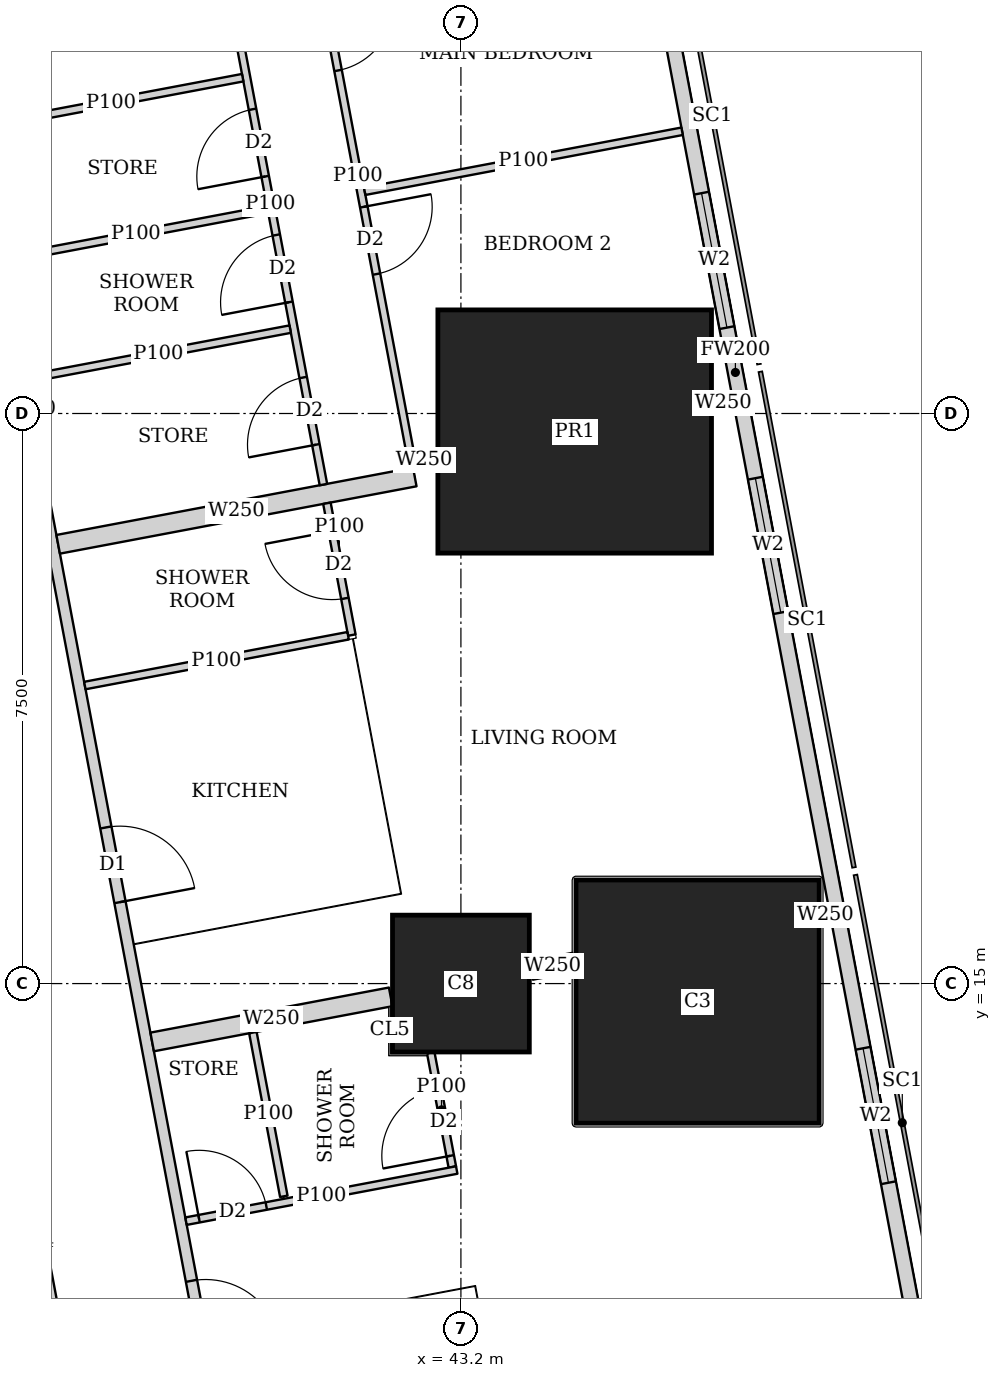
"""IFC4 building model, lengths in metres.
Left out: names, types, materials, properties, quantities, classifications, styles, units other than length and angle.
Written with IfcOpenShell. Run it as: python <this file> out.ifc"""

import sys

from ifc_helpers import new_model, si_unit, direction, frame, frame_2d, origin, origin_2d, place, context, subcontext, project, spatial, rectangle, extrude, element, fill, save


model = new_model("IFC4")
c1 = context("Model", 3, precision=1e-05, world=origin(), true_north=direction((0.0, 1.0)))
c2 = subcontext(c1, "Body", "Model", "MODEL_VIEW")
j1 = project(units=[si_unit("LENGTHUNIT", "METRE"), si_unit("PLANEANGLEUNIT", "RADIAN")], contexts=[c1])
p1 = place(None, origin())
s1 = spatial("IfcSite", under=j1, at=p1, CompositionType="ELEMENT")
p2 = place(p1, origin())
s2 = spatial("IfcBuilding", under=s1, at=p2, CompositionType="ELEMENT")
p3 = place(p2, frame((0.0, 0.0, 23.75)))
s3 = spatial("IfcBuildingStorey", under=s2, at=p3, CompositionType="ELEMENT", Elevation=23.75)
p4 = place(p3, frame((43.2, 15.0, 0.0), z_axis=(0.0, 0.0, 1.0), x_axis=(1.0, 0.0, 0.0)))
e1 = element("IfcColumn", 1, at=p4, inside=s3, PredefinedType="COLUMN", context=c2, shape_type="SweptSolid", body=[
    extrude(rectangle(XDim=1.8, YDim=1.8, at=origin_2d()), origin(), (0.0, 0.0, 1.0), 3.75),
])
p5 = place(p3, frame((46.314, 14.763, 0.0), z_axis=(0.0, 0.0, 1.0), x_axis=(1.0, 0.0, 0.0)))
e2 = element("IfcColumn", 2, at=p5, inside=s3, PredefinedType="COLUMN", context=c2, shape_type="SweptSolid", body=[
    extrude(rectangle(XDim=3.2, YDim=3.2, at=origin_2d()), origin(), (0.0, 0.0, 1.0), 3.75),
])
p6 = place(p3, frame((44.697, 22.263, 0.0), z_axis=(0.0, 0.0, 1.0), x_axis=(1.0, 0.0, 0.0)))
e3 = element("IfcColumn", 3, at=p6, inside=s3, PredefinedType="COLUMN", context=c2, shape_type="SweptSolid", body=[
    extrude(rectangle(XDim=3.6, YDim=3.2, at=origin_2d()), origin(), (0.0, 0.0, 1.0), 3.75),
])
p7 = place(p3, frame((50.653, 2.703, 0.0), z_axis=(0.0, 0.0, 1.0), x_axis=(-0.185612026696, 0.982623109613, 0.0)))
e4 = element("IfcWall", 4, at=p7, inside=s3, PredefinedType="SOLIDWALL", context=c2, shape_type="SweptSolid", body=[
    extrude(rectangle(XDim=41.393, YDim=0.2, at=frame_2d((20.697, 0.0))), origin(), (0.0, 0.0, 1.0), 3.5),
])
p8 = place(p7, frame((1.633, 0.0, 0.9)))
e5 = element("IfcOpeningElement", 5, at=p8, cuts=e4, PredefinedType="OPENING", context=c2, shape_type="SweptSolid", body=[
    extrude(rectangle(XDim=1.8, YDim=1.5, at=frame_2d((0.9, 0.75))), frame((0.0, 0.11, 0.0), z_axis=(0.0, -1.0, 0.0), x_axis=(1.0, 0.0, 0.0)), (0.0, 0.0, 1.0), 0.22),
])
p9 = place(p7, frame((6.032, 0.0, 0.9)))
e6 = element("IfcOpeningElement", 6, at=p9, cuts=e4, PredefinedType="OPENING", context=c2, shape_type="SweptSolid", body=[
    extrude(rectangle(XDim=1.8, YDim=1.5, at=frame_2d((0.9, 0.75))), frame((0.0, 0.11, 0.0), z_axis=(0.0, -1.0, 0.0), x_axis=(1.0, 0.0, 0.0)), (0.0, 0.0, 1.0), 0.22),
])
p10 = place(p7, frame((9.848, 0.0, 0.9)))
e7 = element("IfcOpeningElement", 7, at=p10, cuts=e4, PredefinedType="OPENING", context=c2, shape_type="SweptSolid", body=[
    extrude(rectangle(XDim=1.8, YDim=1.5, at=frame_2d((0.9, 0.75))), frame((0.0, 0.11, 0.0), z_axis=(0.0, -1.0, 0.0), x_axis=(1.0, 0.0, 0.0)), (0.0, 0.0, 1.0), 0.22),
])
p11 = place(p7, frame((17.481, 0.0, 0.9)))
e8 = element("IfcOpeningElement", 8, at=p11, cuts=e4, PredefinedType="OPENING", context=c2, shape_type="SweptSolid", body=[
    extrude(rectangle(XDim=1.8, YDim=1.5, at=frame_2d((0.9, 0.75))), frame((0.0, 0.11, 0.0), z_axis=(0.0, -1.0, 0.0), x_axis=(1.0, 0.0, 0.0)), (0.0, 0.0, 1.0), 0.22),
])
p12 = place(p7, frame((21.297, 0.0, 0.9)))
e9 = element("IfcOpeningElement", 9, at=p12, cuts=e4, PredefinedType="OPENING", context=c2, shape_type="SweptSolid", body=[
    extrude(rectangle(XDim=1.8, YDim=1.5, at=frame_2d((0.9, 0.75))), frame((0.0, 0.11, 0.0), z_axis=(0.0, -1.0, 0.0), x_axis=(1.0, 0.0, 0.0)), (0.0, 0.0, 1.0), 0.22),
])
p13 = place(p7, frame((25.113, 0.0, 0.9)))
e10 = element("IfcOpeningElement", 10, at=p13, cuts=e4, PredefinedType="OPENING", context=c2, shape_type="SweptSolid", body=[
    extrude(rectangle(XDim=1.8, YDim=1.5, at=frame_2d((0.9, 0.75))), frame((0.0, 0.11, 0.0), z_axis=(0.0, -1.0, 0.0), x_axis=(1.0, 0.0, 0.0)), (0.0, 0.0, 1.0), 0.22),
])
p14 = place(p7, frame((28.93, 0.0, 0.9)))
e11 = element("IfcOpeningElement", 11, at=p14, cuts=e4, PredefinedType="OPENING", context=c2, shape_type="SweptSolid", body=[
    extrude(rectangle(XDim=1.8, YDim=1.5, at=frame_2d((0.9, 0.75))), frame((0.0, 0.11, 0.0), z_axis=(0.0, -1.0, 0.0), x_axis=(1.0, 0.0, 0.0)), (0.0, 0.0, 1.0), 0.22),
])
p15 = place(p7, frame((32.746, 0.0, 0.9)))
e12 = element("IfcOpeningElement", 12, at=p15, cuts=e4, PredefinedType="OPENING", context=c2, shape_type="SweptSolid", body=[
    extrude(rectangle(XDim=1.8, YDim=1.5, at=frame_2d((0.9, 0.75))), frame((0.0, 0.11, 0.0), z_axis=(0.0, -1.0, 0.0), x_axis=(1.0, 0.0, 0.0)), (0.0, 0.0, 1.0), 0.22),
])
p16 = place(p7, frame((36.481, 0.0, 0.9)))
e13 = element("IfcOpeningElement", 13, at=p16, cuts=e4, PredefinedType="OPENING", context=c2, shape_type="SweptSolid", body=[
    extrude(rectangle(XDim=1.8, YDim=1.5, at=frame_2d((0.9, 0.75))), frame((0.0, 0.11, 0.0), z_axis=(0.0, -1.0, 0.0), x_axis=(1.0, 0.0, 0.0)), (0.0, 0.0, 1.0), 0.22),
])
p17 = place(p3, frame((33.755, 42.325, 0.0), z_axis=(0.0, 0.0, 1.0), x_axis=(0.185611461091, -0.982623216453, 0.0)))
e14 = element("IfcWall", 14, at=p17, inside=s3, PredefinedType="SOLIDWALL", context=c2, shape_type="SweptSolid", body=[
    extrude(rectangle(XDim=40.241, YDim=0.15, at=frame_2d((20.121, 0.0))), origin(), (0.0, 0.0, 1.0), 2.5),
])
p18 = place(p17, frame((7.325, 0.0, 0.0)))
e15 = element("IfcOpeningElement", 15, at=p18, cuts=e14, PredefinedType="OPENING", context=c2, shape_type="SweptSolid", body=[
    extrude(rectangle(XDim=1.0, YDim=2.1, at=frame_2d((0.5, 1.05))), frame((0.0, 0.085, 0.0), z_axis=(0.0, -1.0, 0.0), x_axis=(1.0, 0.0, 0.0)), (0.0, 0.0, 1.0), 0.17),
])
p19 = place(p17, frame((11.902, 0.0, 0.0)))
e16 = element("IfcOpeningElement", 16, at=p19, cuts=e14, PredefinedType="OPENING", context=c2, shape_type="SweptSolid", body=[
    extrude(rectangle(XDim=1.0, YDim=2.1, at=frame_2d((0.5, 1.05))), frame((0.0, 0.085, 0.0), z_axis=(0.0, -1.0, 0.0), x_axis=(1.0, 0.0, 0.0)), (0.0, 0.0, 1.0), 0.17),
])
p20 = place(p17, frame((25.718, 0.0, 0.0)))
e17 = element("IfcOpeningElement", 17, at=p20, cuts=e14, PredefinedType="OPENING", context=c2, shape_type="SweptSolid", body=[
    extrude(rectangle(XDim=1.0, YDim=2.1, at=frame_2d((0.5, 1.05))), frame((0.0, 0.085, 0.0), z_axis=(0.0, -1.0, 0.0), x_axis=(1.0, 0.0, 0.0)), (0.0, 0.0, 1.0), 0.17),
])
p21 = place(p17, frame((31.788, 0.0, 0.0)))
e18 = element("IfcOpeningElement", 18, at=p21, cuts=e14, PredefinedType="OPENING", context=c2, shape_type="SweptSolid", body=[
    extrude(rectangle(XDim=1.0, YDim=2.1, at=frame_2d((0.5, 1.05))), frame((0.0, 0.085, 0.0), z_axis=(0.0, -1.0, 0.0), x_axis=(1.0, 0.0, 0.0)), (0.0, 0.0, 1.0), 0.17),
])
p22 = place(p3, frame((41.157, 29.273, 0.0), z_axis=(0.0, 0.0, 1.0), x_axis=(0.18542464283, -0.982658486877, 0.0)))
e19 = element("IfcWall", 19, at=p22, inside=s3, PredefinedType="PARTITIONING", context=c2, shape_type="SweptSolid", body=[
    extrude(rectangle(XDim=7.421, YDim=0.1, at=frame_2d((3.71, 0.0))), origin(), (0.0, 0.0, 1.0), 2.5),
])
p23 = place(p22, frame((1.4, 0.0, 0.0)))
e20 = element("IfcOpeningElement", 20, at=p23, cuts=e19, PredefinedType="OPENING", context=c2, shape_type="SweptSolid", body=[
    extrude(rectangle(XDim=0.9, YDim=2.1, at=frame_2d((0.45, 1.05))), frame((0.0, 0.06, 0.0), z_axis=(0.0, -1.0, 0.0), x_axis=(1.0, 0.0, 0.0)), (0.0, 0.0, 1.0), 0.12),
])
p24 = place(p22, frame((4.126, 0.0, 0.0)))
e21 = element("IfcOpeningElement", 21, at=p24, cuts=e19, PredefinedType="OPENING", context=c2, shape_type="SweptSolid", body=[
    extrude(rectangle(XDim=0.9, YDim=2.1, at=frame_2d((0.45, 1.05))), frame((0.0, 0.06, 0.0), z_axis=(0.0, -1.0, 0.0), x_axis=(1.0, 0.0, 0.0)), (0.0, 0.0, 1.0), 0.12),
])
p25 = place(p3, frame((39.997, 28.942, 0.0), z_axis=(0.0, 0.0, 1.0), x_axis=(0.185686318797, -0.982609073341, 0.0)))
e22 = element("IfcWall", 22, at=p25, inside=s3, PredefinedType="PARTITIONING", context=c2, shape_type="SweptSolid", body=[
    extrude(rectangle(XDim=7.508, YDim=0.1, at=frame_2d((3.754, 0.0))), origin(), (0.0, 0.0, 1.0), 2.5),
])
p26 = place(p25, frame((0.576, 0.0, 0.0)))
e23 = element("IfcOpeningElement", 23, at=p26, cuts=e22, PredefinedType="OPENING", context=c2, shape_type="SweptSolid", body=[
    extrude(rectangle(XDim=0.9, YDim=2.1, at=frame_2d((0.45, 1.05))), frame((0.0, 0.06, 0.0), z_axis=(0.0, -1.0, 0.0), x_axis=(1.0, 0.0, 0.0)), (0.0, 0.0, 1.0), 0.12),
])
p27 = place(p25, frame((4.166, 0.0, 0.0)))
e24 = element("IfcOpeningElement", 24, at=p27, cuts=e22, PredefinedType="OPENING", context=c2, shape_type="SweptSolid", body=[
    extrude(rectangle(XDim=0.9, YDim=2.1, at=frame_2d((0.45, 1.05))), frame((0.0, 0.06, 0.0), z_axis=(0.0, -1.0, 0.0), x_axis=(1.0, 0.0, 0.0)), (0.0, 0.0, 1.0), 0.12),
])
p28 = place(p25, frame((2.483, 0.0, 0.0)))
e25 = element("IfcOpeningElement", 25, at=p28, cuts=e22, PredefinedType="OPENING", context=c2, shape_type="SweptSolid", body=[
    extrude(rectangle(XDim=0.9, YDim=2.1, at=frame_2d((0.45, 1.05))), frame((0.0, 0.06, 0.0), z_axis=(0.0, -1.0, 0.0), x_axis=(1.0, 0.0, 0.0)), (0.0, 0.0, 1.0), 0.12),
])
p29 = place(p25, frame((6.074, 0.0, 0.0)))
e26 = element("IfcOpeningElement", 26, at=p29, cuts=e22, PredefinedType="OPENING", context=c2, shape_type="SweptSolid", body=[
    extrude(rectangle(XDim=0.9, YDim=2.1, at=frame_2d((0.45, 1.05))), frame((0.0, 0.06, 0.0), z_axis=(0.0, -1.0, 0.0), x_axis=(1.0, 0.0, 0.0)), (0.0, 0.0, 1.0), 0.12),
])
p30 = place(p3, frame((46.11, 26.213, 0.0), z_axis=(0.0, 0.0, 1.0), x_axis=(-0.982623519589, -0.185609856287, 0.0)))
e27 = element("IfcWall", 27, at=p30, inside=s3, PredefinedType="PARTITIONING", context=c2, shape_type="SweptSolid", body=[
    extrude(rectangle(XDim=4.25, YDim=0.1, at=frame_2d((2.125, 0.0))), origin(), (0.0, 0.0, 1.0), 2.05),
])
p31 = place(p3, frame((40.656, 25.183, 0.0), z_axis=(0.0, 0.0, 1.0), x_axis=(-0.982576058723, -0.185860939478, 0.0)))
e28 = element("IfcWall", 28, at=p31, inside=s3, PredefinedType="PARTITIONING", context=c2, shape_type="SweptSolid", body=[
    extrude(rectangle(XDim=3.524, YDim=0.1, at=frame_2d((1.762, 0.0))), origin(), (0.0, 0.0, 1.0), 3.5),
])
p32 = place(p3, frame((40.329, 26.918, 0.0), z_axis=(0.0, 0.0, 1.0), x_axis=(-0.982638553676, -0.185530247748, 0.0)))
e29 = element("IfcWall", 29, at=p32, inside=s3, PredefinedType="PARTITIONING", context=c2, shape_type="SweptSolid", body=[
    extrude(rectangle(XDim=3.525, YDim=0.1, at=frame_2d((1.763, 0.0))), origin(), (0.0, 0.0, 1.0), 3.5),
])
p33 = place(p3, frame((40.954, 23.61, 0.0), z_axis=(0.0, 0.0, 1.0), x_axis=(-0.982638553676, -0.185530247748, 0.0)))
e30 = element("IfcWall", 30, at=p33, inside=s3, PredefinedType="PARTITIONING", context=c2, shape_type="SweptSolid", body=[
    extrude(rectangle(XDim=3.525, YDim=0.1, at=frame_2d((1.763, 0.0))), origin(), (0.0, 0.0, 1.0), 2.5),
])
p34 = place(p3, frame((41.437, 21.319, 0.0), z_axis=(0.0, 0.0, 1.0), x_axis=(0.185783379659, -0.98259072652, 0.0)))
e31 = element("IfcWall", 31, at=p34, inside=s3, PredefinedType="PARTITIONING", context=c2, shape_type="SweptSolid", body=[
    extrude(rectangle(XDim=1.765, YDim=0.1, at=frame_2d((0.882, 0.0))), origin(), (0.0, 0.0, 1.0), 3.5),
])
p35 = place(p34, frame((0.374, 0.0, 0.0)))
e32 = element("IfcOpeningElement", 32, at=p35, cuts=e31, PredefinedType="OPENING", context=c2, shape_type="SweptSolid", body=[
    extrude(rectangle(XDim=0.9, YDim=2.1, at=frame_2d((0.45, 1.05))), frame((0.0, 0.06, 0.0), z_axis=(0.0, -1.0, 0.0), x_axis=(1.0, 0.0, 0.0)), (0.0, 0.0, 1.0), 0.12),
])
p36 = place(p3, frame((41.716, 19.576, 0.0), z_axis=(0.0, 0.0, 1.0), x_axis=(-0.982588017646, -0.185797706064, 0.0)))
e33 = element("IfcWall", 33, at=p36, inside=s3, PredefinedType="PARTITIONING", context=c2, shape_type="SweptSolid", body=[
    extrude(rectangle(XDim=3.525, YDim=0.1, at=frame_2d((1.763, 0.0))), origin(), (0.0, 0.0, 1.0), 3.5),
])
p37 = place(p3, frame((46.782, 22.657, 0.0), z_axis=(0.0, 0.0, 1.0), x_axis=(-0.982104607121, -0.188336243648, 0.0)))
e34 = element("IfcWall", 34, at=p37, inside=s3, PredefinedType="SOLIDWALL", context=c2, shape_type="SweptSolid", body=[
    extrude(rectangle(XDim=0.266, YDim=0.25, at=frame_2d((0.133, 0.0))), origin(), (0.0, 0.0, 1.0), 3.5),
])
p38 = place(p3, frame((42.873, 21.918, 0.0), z_axis=(0.0, 0.0, 1.0), x_axis=(-0.982431406936, -0.186624035603, 0.0)))
e35 = element("IfcWall", 35, at=p38, inside=s3, PredefinedType="SOLIDWALL", context=c2, shape_type="SweptSolid", body=[
    extrude(rectangle(XDim=0.322, YDim=0.25, at=frame_2d((0.161, 0.0))), origin(), (0.0, 0.0, 1.0), 2.5),
])
p39 = place(p3, frame((42.593, 21.665, 0.0), z_axis=(0.0, 0.0, 1.0), x_axis=(-0.982635807605, -0.185544791394, 0.0)))
e36 = element("IfcWall", 36, at=p39, inside=s3, PredefinedType="SOLIDWALL", context=c2, shape_type="SweptSolid", body=[
    extrude(rectangle(XDim=4.775, YDim=0.25, at=frame_2d((2.388, 0.0))), origin(), (0.0, 0.0, 1.0), 2.5),
])
p40 = place(p3, frame((42.803, 14.09, 0.0), z_axis=(0.0, 0.0, 1.0), x_axis=(0.185608486942, -0.982623778246, 0.0)))
e37 = element("IfcWall", 37, at=p40, inside=s3, PredefinedType="PARTITIONING", context=c2, shape_type="SweptSolid", body=[
    extrude(rectangle(XDim=1.53, YDim=0.1, at=frame_2d((0.765, 0.0))), origin(), (0.0, 0.0, 1.0), 3.5),
])
p41 = place(p40, frame((0.48, 0.0, 0.0)))
e38 = element("IfcOpeningElement", 38, at=p41, cuts=e37, PredefinedType="OPENING", context=c2, shape_type="SweptSolid", body=[
    extrude(rectangle(XDim=0.9, YDim=2.1, at=frame_2d((0.45, 1.05))), frame((0.0, 0.06, 0.0), z_axis=(0.0, -1.0, 0.0), x_axis=(1.0, 0.0, 0.0)), (0.0, 0.0, 1.0), 0.12),
])
p42 = place(p3, frame((43.145, 12.547, 0.0), z_axis=(0.0, 0.0, 1.0), x_axis=(-0.982610451136, -0.185679027675, 0.0)))
e39 = element("IfcWall", 39, at=p42, inside=s3, PredefinedType="PARTITIONING", context=c2, shape_type="SweptSolid", body=[
    extrude(rectangle(XDim=3.625, YDim=0.1, at=frame_2d((1.812, 0.0))), origin(), (0.0, 0.0, 1.0), 3.5),
])
p43 = place(p42, frame((2.55, 0.0, 0.0)))
e40 = element("IfcOpeningElement", 40, at=p43, cuts=e39, PredefinedType="OPENING", context=c2, shape_type="SweptSolid", body=[
    extrude(rectangle(XDim=0.9, YDim=2.1, at=frame_2d((0.45, 1.05))), frame((0.0, 0.06, 0.0), z_axis=(0.0, -1.0, 0.0), x_axis=(1.0, 0.0, 0.0)), (0.0, 0.0, 1.0), 0.12),
])
p44 = place(p3, frame((40.463, 14.355, 0.0), z_axis=(0.0, 0.0, 1.0), x_axis=(0.185760900029, -0.98259497659, 0.0)))
e41 = element("IfcWall", 41, at=p44, inside=s3, PredefinedType="PARTITIONING", context=c2, shape_type="SweptSolid", body=[
    extrude(rectangle(XDim=2.192, YDim=0.1, at=frame_2d((1.096, 0.0))), origin(), (0.0, 0.0, 1.0), 3.5),
])
p45 = place(p3, frame((48.055, 15.917, 0.0), z_axis=(0.0, 0.0, 1.0), x_axis=(-0.98280243359, -0.184660164975, 0.0)))
e42 = element("IfcWall", 42, at=p45, inside=s3, PredefinedType="SOLIDWALL", context=c2, shape_type="SweptSolid", body=[
    extrude(rectangle(XDim=0.119, YDim=0.25, at=frame_2d((0.06, 0.0))), origin(), (0.0, 0.0, 1.0), 3.5),
])
p46 = place(p3, frame((44.69, 15.281, 0.0), z_axis=(0.0, 0.0, 1.0), x_axis=(-0.982612073204, -0.185670443513, 0.0)))
e43 = element("IfcWall", 43, at=p46, inside=s3, PredefinedType="SOLIDWALL", context=c2, shape_type="SweptSolid", body=[
    extrude(rectangle(XDim=0.576, YDim=0.25, at=frame_2d((0.288, 0.0))), origin(), (0.0, 0.0, 1.0), 2.05),
])
p47 = place(p3, frame((42.276, 14.825, 0.0), z_axis=(0.0, 0.0, 1.0), x_axis=(-0.982607211054, -0.185696173318, 0.0)))
e44 = element("IfcWall", 44, at=p47, inside=s3, PredefinedType="SOLIDWALL", context=c2, shape_type="SweptSolid", body=[
    extrude(rectangle(XDim=3.194, YDim=0.25, at=frame_2d((1.597, 0.0))), origin(), (0.0, 0.0, 1.0), 3.5),
])
p48 = place(p3, frame((37.9, 10.413, 0.0), z_axis=(0.0, 0.0, 1.0), x_axis=(-0.185527510388, 0.982639070508, 0.0)))
e45 = element("IfcWall", 45, at=p48, inside=s3, PredefinedType="PARTITIONING", context=c2, shape_type="SweptSolid", body=[
    extrude(rectangle(XDim=5.056, YDim=0.125, at=frame_2d((2.528, 0.0))), origin(), (0.0, 0.0, 1.0), 3.5),
])
p49 = place(p48, frame((0.708, 0.0, 0.0)))
e46 = element("IfcOpeningElement", 46, at=p49, cuts=e45, PredefinedType="OPENING", context=c2, shape_type="SweptSolid", body=[
    extrude(rectangle(XDim=1.0, YDim=2.1, at=frame_2d((0.5, 1.05))), frame((0.0, 0.073, 0.0), z_axis=(0.0, -1.0, 0.0), x_axis=(1.0, 0.0, 0.0)), (0.0, 0.0, 1.0), 0.145),
])
p50 = place(p10, origin())
e47 = element("IfcWindow", 47, at=p50, inside=s3, PartitioningType="SINGLE_PANEL", PredefinedType="WINDOW", context=c2, shape_type="SweptSolid", body=[
    extrude(rectangle(XDim=1.8, YDim=1.5, at=frame_2d((0.9, 0.75))), frame((0.0, 0.03, 0.0), z_axis=(0.0, -1.0, 0.0), x_axis=(1.0, 0.0, 0.0)), (0.0, 0.0, 1.0), 0.06),
])
fill(e7, e47)
p51 = place(p11, origin())
e48 = element("IfcWindow", 48, at=p51, inside=s3, PartitioningType="SINGLE_PANEL", PredefinedType="WINDOW", context=c2, shape_type="SweptSolid", body=[
    extrude(rectangle(XDim=1.8, YDim=1.5, at=frame_2d((0.9, 0.75))), frame((0.0, 0.03, 0.0), z_axis=(0.0, -1.0, 0.0), x_axis=(1.0, 0.0, 0.0)), (0.0, 0.0, 1.0), 0.06),
])
fill(e8, e48)
p52 = place(p12, origin())
e49 = element("IfcWindow", 49, at=p52, inside=s3, PartitioningType="SINGLE_PANEL", PredefinedType="WINDOW", context=c2, shape_type="SweptSolid", body=[
    extrude(rectangle(XDim=1.8, YDim=1.5, at=frame_2d((0.9, 0.75))), frame((0.0, 0.03, 0.0), z_axis=(0.0, -1.0, 0.0), x_axis=(1.0, 0.0, 0.0)), (0.0, 0.0, 1.0), 0.06),
])
fill(e9, e49)
p53 = place(p23, origin())
e50 = element("IfcDoor", 50, at=p53, inside=s3, OperationType="SINGLE_SWING_LEFT", PredefinedType="DOOR", context=c2, shape_type="SweptSolid", body=[
    extrude(rectangle(XDim=0.9, YDim=2.1, at=frame_2d((0.45, 1.05))), frame((0.0, 0.025, 0.0), z_axis=(0.0, -1.0, 0.0), x_axis=(1.0, 0.0, 0.0)), (0.0, 0.0, 1.0), 0.05),
])
fill(e20, e50)
p54 = place(p24, origin())
e51 = element("IfcDoor", 51, at=p54, inside=s3, OperationType="SINGLE_SWING_LEFT", PredefinedType="DOOR", context=c2, shape_type="SweptSolid", body=[
    extrude(rectangle(XDim=0.9, YDim=2.1, at=frame_2d((0.45, 1.05))), frame((0.0, 0.025, 0.0), z_axis=(0.0, -1.0, 0.0), x_axis=(1.0, 0.0, 0.0)), (0.0, 0.0, 1.0), 0.05),
])
fill(e21, e51)
p55 = place(p27, origin())
e52 = element("IfcDoor", 52, at=p55, inside=s3, OperationType="SINGLE_SWING_LEFT", PredefinedType="DOOR", context=c2, shape_type="SweptSolid", body=[
    extrude(rectangle(XDim=0.9, YDim=2.1, at=frame_2d((0.45, 1.05))), frame((0.0, 0.025, 0.0), z_axis=(0.0, -1.0, 0.0), x_axis=(1.0, 0.0, 0.0)), (0.0, 0.0, 1.0), 0.05),
])
fill(e24, e52)
p56 = place(p28, origin())
e53 = element("IfcDoor", 53, at=p56, inside=s3, OperationType="SINGLE_SWING_LEFT", PredefinedType="DOOR", context=c2, shape_type="SweptSolid", body=[
    extrude(rectangle(XDim=0.9, YDim=2.1, at=frame_2d((0.45, 1.05))), frame((0.0, 0.025, 0.0), z_axis=(0.0, -1.0, 0.0), x_axis=(1.0, 0.0, 0.0)), (0.0, 0.0, 1.0), 0.05),
])
fill(e25, e53)
p57 = place(p29, origin())
e54 = element("IfcDoor", 54, at=p57, inside=s3, OperationType="SINGLE_SWING_LEFT", PredefinedType="DOOR", context=c2, shape_type="SweptSolid", body=[
    extrude(rectangle(XDim=0.9, YDim=2.1, at=frame_2d((0.45, 1.05))), frame((0.0, 0.025, 0.0), z_axis=(0.0, -1.0, 0.0), x_axis=(1.0, 0.0, 0.0)), (0.0, 0.0, 1.0), 0.05),
])
fill(e26, e54)
p58 = place(p35, origin())
e55 = element("IfcDoor", 55, at=p58, inside=s3, OperationType="SINGLE_SWING_RIGHT", PredefinedType="DOOR", context=c2, shape_type="SweptSolid", body=[
    extrude(rectangle(XDim=0.9, YDim=2.1, at=frame_2d((0.45, 1.05))), frame((0.0, 0.025, 0.0), z_axis=(0.0, -1.0, 0.0), x_axis=(1.0, 0.0, 0.0)), (0.0, 0.0, 1.0), 0.05),
])
fill(e32, e55)
p59 = place(p20, origin())
e56 = element("IfcDoor", 56, at=p59, inside=s3, OperationType="SINGLE_SWING_RIGHT", PredefinedType="DOOR", context=c2, shape_type="SweptSolid", body=[
    extrude(rectangle(XDim=1.0, YDim=2.1, at=frame_2d((0.5, 1.05))), frame((0.0, 0.025, 0.0), z_axis=(0.0, -1.0, 0.0), x_axis=(1.0, 0.0, 0.0)), (0.0, 0.0, 1.0), 0.05),
])
fill(e17, e56)
p60 = place(p41, origin())
e57 = element("IfcDoor", 57, at=p60, inside=s3, OperationType="SINGLE_SWING_LEFT", PredefinedType="DOOR", context=c2, shape_type="SweptSolid", body=[
    extrude(rectangle(XDim=0.9, YDim=2.1, at=frame_2d((0.45, 1.05))), frame((0.0, 0.025, 0.0), z_axis=(0.0, -1.0, 0.0), x_axis=(1.0, 0.0, 0.0)), (0.0, 0.0, 1.0), 0.05),
])
fill(e38, e57)
p61 = place(p43, origin())
e58 = element("IfcDoor", 58, at=p61, inside=s3, OperationType="SINGLE_SWING_LEFT", PredefinedType="DOOR", context=c2, shape_type="SweptSolid", body=[
    extrude(rectangle(XDim=0.9, YDim=2.1, at=frame_2d((0.45, 1.05))), frame((0.0, 0.025, 0.0), z_axis=(0.0, -1.0, 0.0), x_axis=(1.0, 0.0, 0.0)), (0.0, 0.0, 1.0), 0.05),
])
fill(e40, e58)
p62 = place(p21, origin())
e59 = element("IfcDoor", 59, at=p62, inside=s3, OperationType="SINGLE_SWING_RIGHT", PredefinedType="DOOR", context=c2, shape_type="SweptSolid", body=[
    extrude(rectangle(XDim=1.0, YDim=2.1, at=frame_2d((0.5, 1.05))), frame((0.0, 0.025, 0.0), z_axis=(0.0, -1.0, 0.0), x_axis=(1.0, 0.0, 0.0)), (0.0, 0.0, 1.0), 0.05),
])
fill(e18, e59)
save(model, sys.argv[1])
